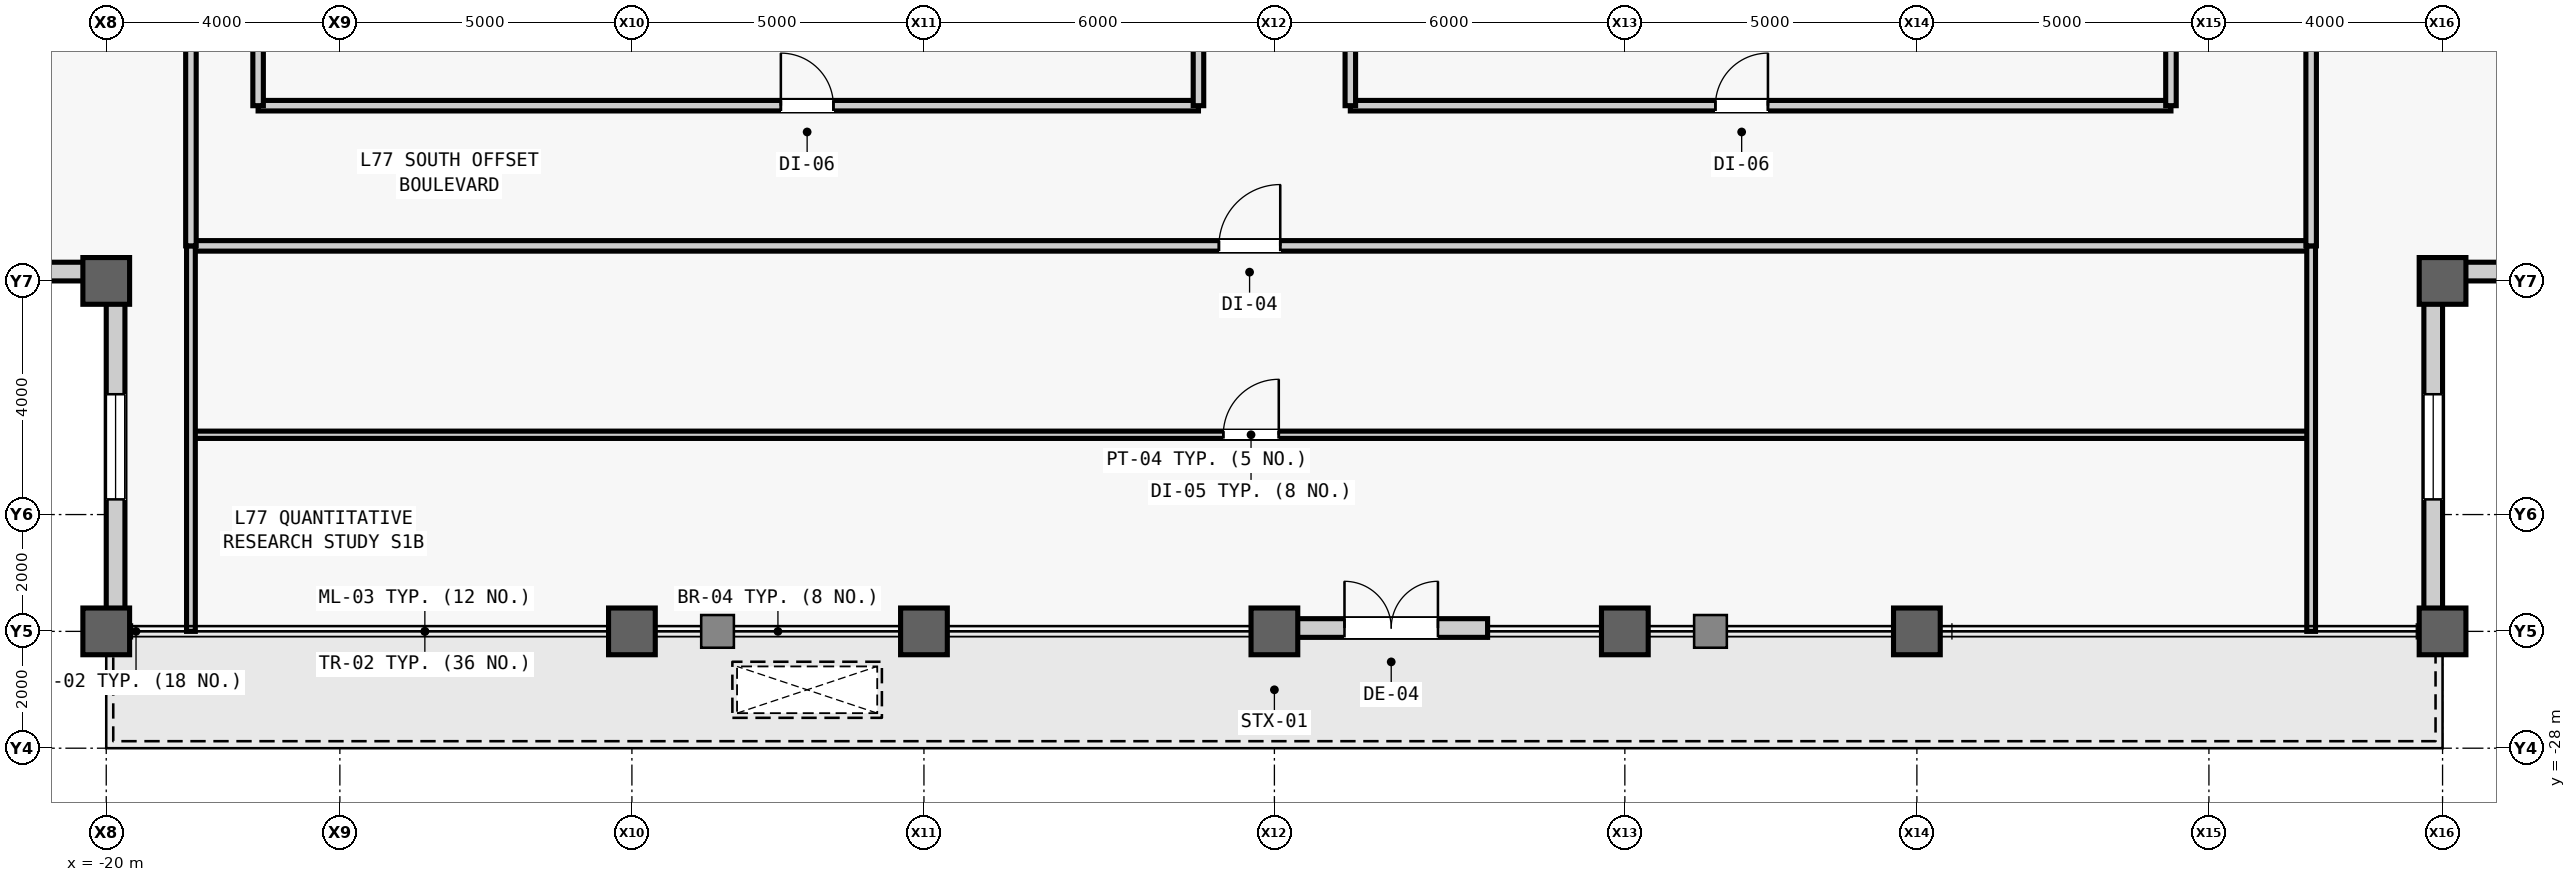
"""IFC4 building model, lengths in metres.
Left out: names, types, materials, properties, quantities, classifications, styles, units other than length and angle.
Written with IfcOpenShell. Run it as: python <this file> out.ifc"""

import sys

from ifc_helpers import new_model, si_unit, direction, frame, frame_2d, origin, origin_2d, place, context, subcontext, project, spatial, rectangle, hollow_rectangle, extrude, source, transform, mapped, element, fill, save


model = new_model("IFC4")
c1 = context("Model", 3, precision=1e-05, world=origin(), true_north=direction((0.0, 1.0)))
c2 = subcontext(c1, "Body", "Model", "MODEL_VIEW")
j1 = project(units=[si_unit("LENGTHUNIT", "METRE"), si_unit("PLANEANGLEUNIT", "RADIAN")], contexts=[c1])
p1 = place(None, origin())
s1 = spatial("IfcSite", under=j1, at=p1, CompositionType="ELEMENT")
p2 = place(p1, origin())
s2 = spatial("IfcBuilding", under=s1, at=p2, CompositionType="ELEMENT")
p3 = place(p2, frame((0.0, 0.0, 326.3)))
s3 = spatial("IfcBuildingStorey", under=s2, at=p3, CompositionType="ELEMENT", Elevation=326.3)
m1 = source(origin(), c2, "Body", "SweptSolid", [
    extrude(hollow_rectangle(XDim=0.8, YDim=0.8, WallThickness=0.045, at=origin_2d()), origin(), (0.0, 0.0, 1.0), 4.0),
])
for number, where, z_axis, x_axis in (
    (1, (-20.0, -26.0, 0.0), (0.0, 0.0, 1.0), (1.0, 0.0, 0.0)),
    (2, (-20.0, -20.0, 0.0), (0.0, 0.0, 1.0), (1.0, 0.0, 0.0)),
    (3, (-11.0, -26.0, 0.0), (0.0, 0.0, 1.0), (1.0, 0.0, 0.0)),
    (4, (-6.0, -26.0, 0.0), (0.0, 0.0, 1.0), (1.0, 0.0, 0.0)),
    (5, (0.0, -26.0, 0.0), (0.0, 0.0, 1.0), (1.0, 0.0, 0.0)),
    (6, (6.0, -26.0, 0.0), (0.0, 0.0, 1.0), (1.0, 0.0, 0.0)),
    (7, (11.0, -26.0, 0.0), (0.0, 0.0, 1.0), (1.0, 0.0, 0.0)),
    (8, (20.0, -26.0, 0.0), (0.0, 0.0, 1.0), (1.0, 0.0, 0.0)),
    (9, (20.0, -20.0, 0.0), (0.0, 0.0, 1.0), (1.0, 0.0, 0.0)),
):
    element("IfcColumn", number, at=place(p3, frame(where, z_axis=z_axis, x_axis=x_axis)), inside=s3, PredefinedType="COLUMN", context=c2, shape_type="MappedRepresentation", body=[
        mapped(m1, transform((0.0, 0.0, 0.0), scale=1.0)),
    ])
m2 = source(origin(), c2, "Body", "SweptSolid", [
    extrude(rectangle(XDim=5.68, YDim=0.32, at=frame_2d((2.84, 0.0))), origin(), (0.0, 0.0, 1.0), 3.191),
])
p4 = place(p3, frame((-20.0, -19.84, 0.0), z_axis=(0.0, 0.0, 1.0), x_axis=(-1.0, 0.0, 0.0)))
e10 = element("IfcWall", 10, at=p4, inside=s3, PredefinedType="STANDARD", context=c2, shape_type="MappedRepresentation", body=[
    mapped(m2, transform((0.0, 0.0, 0.0), scale=1.0)),
])
m3 = source(origin(), c2, "Body", "SweptSolid", [
    extrude(rectangle(XDim=1.8, YDim=2.4, at=frame_2d((0.9, 1.2))), frame((0.0, 0.17, 0.0), z_axis=(0.0, -1.0, 0.0), x_axis=(1.0, 0.0, 0.0)), (0.0, 0.0, 1.0), 0.34),
])
p5 = place(p4, frame((1.94, 0.0, 0.5)))
e11 = element("IfcOpeningElement", 11, at=p5, cuts=e10, PredefinedType="OPENING", context=c2, shape_type="MappedRepresentation", body=[
    mapped(m3, transform((0.0, 0.0, 0.0), scale=1.0)),
])
p6 = place(p3, frame((-19.84, -25.68, 0.0), z_axis=(0.0, 0.0, 1.0), x_axis=(0.0, 1.0, 0.0)))
e12 = element("IfcWall", 12, at=p6, inside=s3, PredefinedType="STANDARD", context=c2, shape_type="MappedRepresentation", body=[
    mapped(m2, transform((0.0, 0.0, 0.0), scale=1.0)),
])
p7 = place(p6, frame((1.94, 0.0, 0.5)))
e13 = element("IfcOpeningElement", 13, at=p7, cuts=e12, PredefinedType="OPENING", context=c2, shape_type="MappedRepresentation", body=[
    mapped(m3, transform((0.0, 0.0, 0.0), scale=1.0)),
])
p8 = place(p3, frame((19.84, -25.68, 0.0), z_axis=(0.0, 0.0, 1.0), x_axis=(0.0, 1.0, 0.0)))
e14 = element("IfcWall", 14, at=p8, inside=s3, PredefinedType="STANDARD", context=c2, shape_type="MappedRepresentation", body=[
    mapped(m2, transform((0.0, 0.0, 0.0), scale=1.0)),
])
p9 = place(p8, frame((1.94, 0.0, 0.5)))
e15 = element("IfcOpeningElement", 15, at=p9, cuts=e14, PredefinedType="OPENING", context=c2, shape_type="MappedRepresentation", body=[
    mapped(m3, transform((0.0, 0.0, 0.0), scale=1.0)),
])
p10 = place(p3, frame((20.0, -19.84, 0.0), z_axis=(0.0, 0.0, 1.0), x_axis=(1.0, 0.0, 0.0)))
e16 = element("IfcWall", 16, at=p10, inside=s3, PredefinedType="STANDARD", context=c2, shape_type="MappedRepresentation", body=[
    mapped(m2, transform((0.0, 0.0, 0.0), scale=1.0)),
])
p11 = place(p10, frame((1.94, 0.0, 0.5)))
e17 = element("IfcOpeningElement", 17, at=p11, cuts=e16, PredefinedType="OPENING", context=c2, shape_type="MappedRepresentation", body=[
    mapped(m3, transform((0.0, 0.0, 0.0), scale=1.0)),
])
m4 = source(origin(), c2, "Body", "SweptSolid", [
    extrude(rectangle(XDim=3.3, YDim=0.32, at=frame_2d((1.65, 0.0))), origin(), (0.0, 0.0, 1.0), 3.191),
])
p12 = place(p3, frame((0.35, -25.942, 0.0), z_axis=(0.0, 0.0, 1.0), x_axis=(1.0, 0.0, 0.0)))
e18 = element("IfcWall", 18, at=p12, inside=s3, PredefinedType="STANDARD", context=c2, shape_type="MappedRepresentation", body=[
    mapped(m4, transform((0.0, 0.0, 0.0), scale=1.0)),
])
m5 = source(origin(), c2, "Body", "SweptSolid", [
    extrude(rectangle(XDim=1.6, YDim=2.25, at=frame_2d((0.8, 1.125))), frame((0.0, 0.17, 0.0), z_axis=(0.0, -1.0, 0.0), x_axis=(1.0, 0.0, 0.0)), (0.0, 0.0, 1.0), 0.34),
])
p13 = place(p12, frame((0.85, 0.0, 0.0)))
e19 = element("IfcOpeningElement", 19, at=p13, cuts=e18, PredefinedType="OPENING", context=c2, shape_type="MappedRepresentation", body=[
    mapped(m5, transform((0.0, 0.0, 0.0), scale=1.0)),
])
m6 = source(origin(), c2, "Body", "SweptSolid", [
    extrude(rectangle(XDim=16.1, YDim=0.18, at=frame_2d((8.05, 0.0))), origin(), (0.0, 0.0, 1.0), 3.74),
])
p14 = place(p3, frame((-17.4, -17.0, 0.0), z_axis=(0.0, 0.0, 1.0), x_axis=(1.0, 0.0, 0.0)))
e20 = element("IfcWall", 20, at=p14, inside=s3, PredefinedType="PARTITIONING", context=c2, shape_type="MappedRepresentation", body=[
    mapped(m6, transform((0.0, 0.0, 0.0), scale=1.0)),
])
m7 = source(origin(), c2, "Body", "SweptSolid", [
    extrude(rectangle(XDim=0.9, YDim=2.15, at=frame_2d((0.45, 1.075))), frame((0.0, 0.1, 0.0), z_axis=(0.0, -1.0, 0.0), x_axis=(1.0, 0.0, 0.0)), (0.0, 0.0, 1.0), 0.2),
])
p15 = place(p14, frame((8.95, 0.0, 0.0)))
e21 = element("IfcOpeningElement", 21, at=p15, cuts=e20, PredefinedType="OPENING", context=c2, shape_type="MappedRepresentation", body=[
    mapped(m7, transform((0.0, 0.0, 0.0), scale=1.0)),
])
m8 = source(origin(), c2, "Body", "SweptSolid", [
    extrude(rectangle(XDim=7.2, YDim=0.18, at=frame_2d((3.6, 0.0))), origin(), (0.0, 0.0, 1.0), 3.74),
])
p16 = place(p3, frame((-17.4, -17.0, 0.0), z_axis=(0.0, 0.0, 1.0), x_axis=(0.0, 1.0, 0.0)))
e22 = element("IfcWall", 22, at=p16, inside=s3, PredefinedType="PARTITIONING", context=c2, shape_type="MappedRepresentation", body=[
    mapped(m8, transform((0.0, 0.0, 0.0), scale=1.0)),
])
m9 = source(origin(), c2, "Body", "SweptSolid", [
    extrude(rectangle(XDim=6.0, YDim=0.18, at=frame_2d((3.0, 0.0))), origin(), (0.0, 0.0, 1.0), 3.74),
])
p17 = place(p3, frame((-1.3, -17.0, 0.0), z_axis=(0.0, 0.0, 1.0), x_axis=(0.0, 1.0, 0.0)))
e23 = element("IfcWall", 23, at=p17, inside=s3, PredefinedType="PARTITIONING", context=c2, shape_type="MappedRepresentation", body=[
    mapped(m9, transform((0.0, 0.0, 0.0), scale=1.0)),
])
m10 = source(origin(), c2, "Body", "SweptSolid", [
    extrude(rectangle(XDim=14.05, YDim=0.18, at=frame_2d((7.025, 0.0))), origin(), (0.0, 0.0, 1.0), 3.74),
])
p18 = place(p3, frame((1.3, -17.0, 0.0), z_axis=(0.0, 0.0, 1.0), x_axis=(1.0, 0.0, 0.0)))
e24 = element("IfcWall", 24, at=p18, inside=s3, PredefinedType="PARTITIONING", context=c2, shape_type="MappedRepresentation", body=[
    mapped(m10, transform((0.0, 0.0, 0.0), scale=1.0)),
])
p19 = place(p18, frame((6.25, 0.0, 0.0)))
e25 = element("IfcOpeningElement", 25, at=p19, cuts=e24, PredefinedType="OPENING", context=c2, shape_type="MappedRepresentation", body=[
    mapped(m7, transform((0.0, 0.0, 0.0), scale=1.0)),
])
p20 = place(p3, frame((1.3, -17.0, 0.0), z_axis=(0.0, 0.0, 1.0), x_axis=(0.0, 1.0, 0.0)))
e26 = element("IfcWall", 26, at=p20, inside=s3, PredefinedType="PARTITIONING", context=c2, shape_type="MappedRepresentation", body=[
    mapped(m9, transform((0.0, 0.0, 0.0), scale=1.0)),
])
m11 = source(origin(), c2, "Body", "SweptSolid", [
    extrude(rectangle(XDim=6.5, YDim=0.18, at=frame_2d((3.25, 0.0))), origin(), (0.0, 0.0, 1.0), 3.74),
])
p21 = place(p3, frame((15.35, -17.0, 0.0), z_axis=(0.0, 0.0, 1.0), x_axis=(0.0, 1.0, 0.0)))
e27 = element("IfcWall", 27, at=p21, inside=s3, PredefinedType="PARTITIONING", context=c2, shape_type="MappedRepresentation", body=[
    mapped(m11, transform((0.0, 0.0, 0.0), scale=1.0)),
])
m12 = source(origin(), c2, "Body", "SweptSolid", [
    extrude(rectangle(XDim=36.3, YDim=0.125, at=frame_2d((18.15, 0.0))), origin(), (0.0, 0.0, 1.0), 3.74),
])
p22 = place(p3, frame((-18.55, -22.634, 0.0), z_axis=(0.0, 0.0, 1.0), x_axis=(1.0, 0.0, 0.0)))
e28 = element("IfcWall", 28, at=p22, inside=s3, PredefinedType="PARTITIONING", context=c2, shape_type="MappedRepresentation", body=[
    mapped(m12, transform((0.0, 0.0, 0.0), scale=1.0)),
])
m13 = source(origin(), c2, "Body", "SweptSolid", [
    extrude(rectangle(XDim=0.95, YDim=2.15, at=frame_2d((0.475, 1.075))), frame((0.0, 0.073, 0.0), z_axis=(0.0, -1.0, 0.0), x_axis=(1.0, 0.0, 0.0)), (0.0, 0.0, 1.0), 0.145),
])
p23 = place(p22, frame((17.675, 0.0, 0.0)))
e29 = element("IfcOpeningElement", 29, at=p23, cuts=e28, PredefinedType="OPENING", context=c2, shape_type="MappedRepresentation", body=[
    mapped(m13, transform((0.0, 0.0, 0.0), scale=1.0)),
])
m14 = source(origin(), c2, "Body", "SweptSolid", [
    extrude(rectangle(XDim=36.3, YDim=0.18, at=frame_2d((18.15, 0.0))), origin(), (0.0, 0.0, 1.0), 3.393),
])
p24 = place(p3, frame((-18.55, -19.4, 0.0), z_axis=(0.0, 0.0, 1.0), x_axis=(1.0, 0.0, 0.0)))
e30 = element("IfcWall", 30, at=p24, inside=s3, PredefinedType="PARTITIONING", context=c2, shape_type="MappedRepresentation", body=[
    mapped(m14, transform((0.0, 0.0, 0.0), scale=1.0)),
])
m15 = source(origin(), c2, "Body", "SweptSolid", [
    extrude(rectangle(XDim=1.05, YDim=2.2, at=frame_2d((0.525, 1.1))), frame((0.0, 0.1, 0.0), z_axis=(0.0, -1.0, 0.0), x_axis=(1.0, 0.0, 0.0)), (0.0, 0.0, 1.0), 0.2),
])
p25 = place(p24, frame((17.6, 0.0, 0.0)))
e31 = element("IfcOpeningElement", 31, at=p25, cuts=e30, PredefinedType="OPENING", context=c2, shape_type="MappedRepresentation", body=[
    mapped(m15, transform((0.0, 0.0, 0.0), scale=1.0)),
])
m16 = source(origin(), c2, "Body", "SweptSolid", [
    extrude(rectangle(XDim=6.6, YDim=0.15, at=frame_2d((3.3, 0.0))), origin(), (0.0, 0.0, 1.0), 3.74),
])
for number, where, z_axis, x_axis in (
    (32, (-18.55, -26.0, 0.0), (0.0, 0.0, 1.0), (0.0, 1.0, 0.0)),
    (33, (17.75, -26.0, 0.0), (0.0, 0.0, 1.0), (0.0, 1.0, 0.0)),
):
    element("IfcWall", number, at=place(p3, frame(where, z_axis=z_axis, x_axis=x_axis)), inside=s3, PredefinedType="PARTITIONING", context=c2, shape_type="MappedRepresentation", body=[
        mapped(m16, transform((0.0, 0.0, 0.0), scale=1.0)),
    ])
m17 = source(origin(), c2, "Body", "SweptSolid", [
    extrude(rectangle(XDim=39.4, YDim=0.18, at=frame_2d((19.7, 0.0))), origin(), (0.0, 0.0, 1.0), 3.74),
])
p26 = place(p3, frame((-18.55, -19.4, 0.0), z_axis=(0.0, 0.0, 1.0), x_axis=(0.0, 1.0, 0.0)))
e34 = element("IfcWall", 34, at=p26, inside=s3, PredefinedType="PARTITIONING", context=c2, shape_type="MappedRepresentation", body=[
    mapped(m17, transform((0.0, 0.0, 0.0), scale=1.0)),
])
m18 = source(origin(), c2, "Body", "SweptSolid", [
    extrude(rectangle(XDim=0.95, YDim=2.15, at=frame_2d((0.475, 1.075))), frame((0.0, 0.1, 0.0), z_axis=(0.0, -1.0, 0.0), x_axis=(1.0, 0.0, 0.0)), (0.0, 0.0, 1.0), 0.2),
])
p27 = place(p26, frame((7.441, 0.0, 0.0)))
e35 = element("IfcOpeningElement", 35, at=p27, cuts=e34, PredefinedType="OPENING", context=c2, shape_type="MappedRepresentation", body=[
    mapped(m18, transform((0.0, 0.0, 0.0), scale=1.0)),
])
p28 = place(p26, frame((17.899, 0.0, 0.0)))
e36 = element("IfcOpeningElement", 36, at=p28, cuts=e34, PredefinedType="OPENING", context=c2, shape_type="MappedRepresentation", body=[
    mapped(m18, transform((0.0, 0.0, 0.0), scale=1.0)),
])
p29 = place(p26, frame((28.683, 0.0, 0.0)))
e37 = element("IfcOpeningElement", 37, at=p29, cuts=e34, PredefinedType="OPENING", context=c2, shape_type="MappedRepresentation", body=[
    mapped(m18, transform((0.0, 0.0, 0.0), scale=1.0)),
])
p30 = place(p3, frame((17.75, -19.4, 0.0), z_axis=(0.0, 0.0, 1.0), x_axis=(0.0, 1.0, 0.0)))
e38 = element("IfcWall", 38, at=p30, inside=s3, PredefinedType="PARTITIONING", context=c2, shape_type="MappedRepresentation", body=[
    mapped(m17, transform((0.0, 0.0, 0.0), scale=1.0)),
])
p31 = place(p30, frame((17.225, 0.0, 0.0)))
e39 = element("IfcOpeningElement", 39, at=p31, cuts=e38, PredefinedType="OPENING", context=c2, shape_type="MappedRepresentation", body=[
    mapped(m18, transform((0.0, 0.0, 0.0), scale=1.0)),
])
m19 = source(origin(), c2, "Body", "SweptSolid", [
    extrude(rectangle(XDim=1.8, YDim=2.4, at=frame_2d((0.9, 1.2))), frame((0.0, 0.03, 0.0), z_axis=(0.0, -1.0, 0.0), x_axis=(1.0, 0.0, 0.0)), (0.0, 0.0, 1.0), 0.06),
])
p32 = place(p7, origin())
e40 = element("IfcWindow", 40, at=p32, inside=s3, PartitioningType="SINGLE_PANEL", PredefinedType="WINDOW", context=c2, shape_type="MappedRepresentation", body=[
    mapped(m19, transform((0.0, 0.0, 0.0), scale=1.0)),
])
fill(e13, e40)
p33 = place(p9, origin())
e41 = element("IfcWindow", 41, at=p33, inside=s3, PartitioningType="SINGLE_PANEL", PredefinedType="WINDOW", context=c2, shape_type="MappedRepresentation", body=[
    mapped(m19, transform((0.0, 0.0, 0.0), scale=1.0)),
])
fill(e15, e41)
m20 = source(origin(), c2, "Body", "SweptSolid", [
    extrude(rectangle(XDim=1.6, YDim=2.25, at=frame_2d((0.8, 1.125))), frame((0.0, 0.025, 0.0), z_axis=(0.0, -1.0, 0.0), x_axis=(1.0, 0.0, 0.0)), (0.0, 0.0, 1.0), 0.05),
])
p34 = place(p13, origin())
e42 = element("IfcDoor", 42, at=p34, inside=s3, OperationType="DOUBLE_DOOR_SINGLE_SWING", PredefinedType="DOOR", context=c2, shape_type="MappedRepresentation", body=[
    mapped(m20, transform((0.0, 0.0, 0.0), scale=1.0)),
])
fill(e19, e42)
m21 = source(origin(), c2, "Body", "SweptSolid", [
    extrude(rectangle(XDim=0.9, YDim=2.15, at=frame_2d((0.45, 1.075))), frame((0.0, 0.025, 0.0), z_axis=(0.0, -1.0, 0.0), x_axis=(1.0, 0.0, 0.0)), (0.0, 0.0, 1.0), 0.05),
])
p35 = place(p15, origin())
e43 = element("IfcDoor", 43, at=p35, inside=s3, OperationType="SINGLE_SWING_LEFT", PredefinedType="DOOR", context=c2, shape_type="MappedRepresentation", body=[
    mapped(m21, transform((0.0, 0.0, 0.0), scale=1.0)),
])
fill(e21, e43)
p36 = place(p19, origin())
e44 = element("IfcDoor", 44, at=p36, inside=s3, OperationType="SINGLE_SWING_RIGHT", PredefinedType="DOOR", context=c2, shape_type="MappedRepresentation", body=[
    mapped(m21, transform((0.0, 0.0, 0.0), scale=1.0)),
])
fill(e25, e44)
m22 = source(origin(), c2, "Body", "SweptSolid", [
    extrude(rectangle(XDim=0.95, YDim=2.15, at=frame_2d((0.475, 1.075))), frame((0.0, 0.025, 0.0), z_axis=(0.0, -1.0, 0.0), x_axis=(1.0, 0.0, 0.0)), (0.0, 0.0, 1.0), 0.05),
])
p37 = place(p23, origin())
e45 = element("IfcDoor", 45, at=p37, inside=s3, OperationType="SINGLE_SWING_RIGHT", PredefinedType="DOOR", context=c2, shape_type="MappedRepresentation", body=[
    mapped(m22, transform((0.0, 0.0, 0.0), scale=1.0)),
])
fill(e29, e45)
m23 = source(origin(), c2, "Body", "SweptSolid", [
    extrude(rectangle(XDim=1.05, YDim=2.2, at=frame_2d((0.525, 1.1))), frame((0.0, 0.025, 0.0), z_axis=(0.0, -1.0, 0.0), x_axis=(1.0, 0.0, 0.0)), (0.0, 0.0, 1.0), 0.05),
])
p38 = place(p25, origin())
e46 = element("IfcDoor", 46, at=p38, inside=s3, OperationType="SINGLE_SWING_RIGHT", PredefinedType="DOOR", context=c2, shape_type="MappedRepresentation", body=[
    mapped(m23, transform((0.0, 0.0, 0.0), scale=1.0)),
])
fill(e31, e46)
save(model, sys.argv[1])
